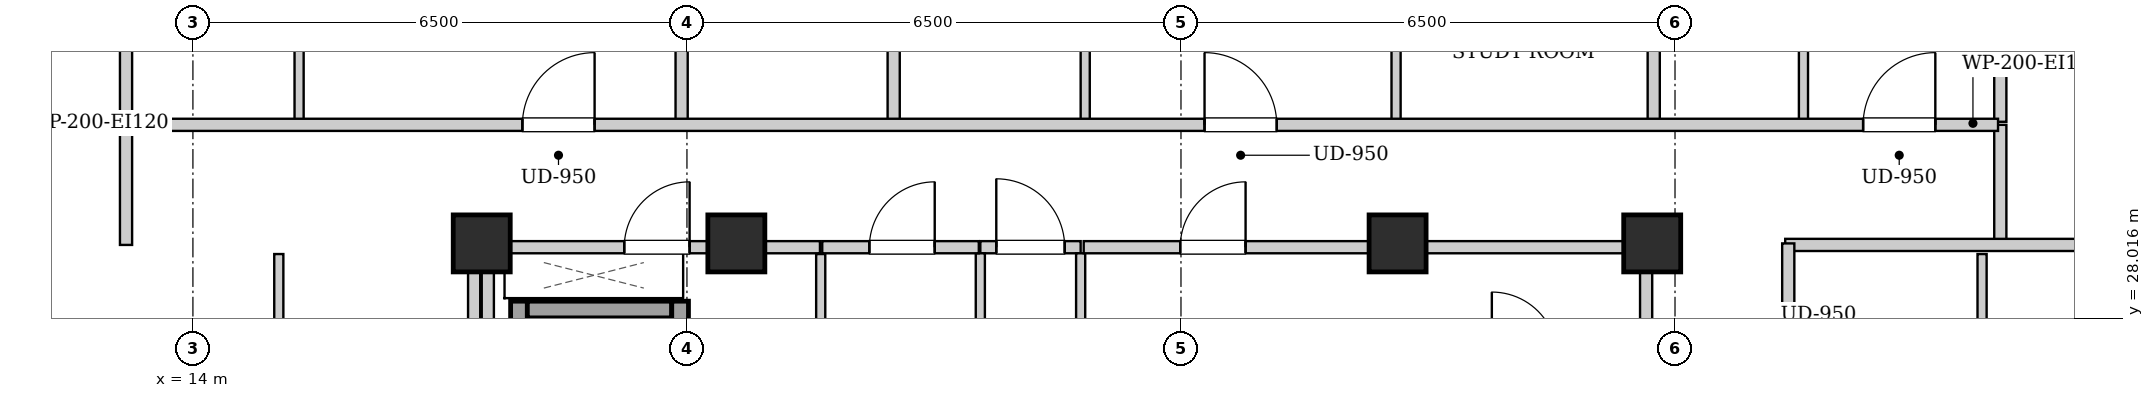
"""IFC4 building model, lengths in metres.
Left out: names, types, materials, properties, quantities, classifications, styles, units other than length and angle.
Written with IfcOpenShell. Run it as: python <this file> out.ifc"""

import sys

from ifc_helpers import new_model, si_unit, direction, frame, frame_2d, origin, origin_2d, place, context, subcontext, project, spatial, rectangle, extrude, element, fill, save


model = new_model("IFC4")
c1 = context("Model", 3, precision=1e-05, world=origin(), true_north=direction((0.0, 1.0)))
c2 = subcontext(c1, "Body", "Model", "MODEL_VIEW")
j1 = project(units=[si_unit("LENGTHUNIT", "METRE"), si_unit("PLANEANGLEUNIT", "RADIAN")], contexts=[c1])
p1 = place(None, origin())
s1 = spatial("IfcSite", under=j1, at=p1, CompositionType="ELEMENT")
p2 = place(p1, origin())
s2 = spatial("IfcBuilding", under=s1, at=p2, CompositionType="ELEMENT")
p3 = place(p2, frame((0.0, 0.0, 217.3)))
s3 = spatial("IfcBuildingStorey", under=s2, at=p3, CompositionType="ELEMENT", Elevation=217.3)
for number, where, z_axis, x_axis in (
    (1, (17.8, 29.0, 0.0), (0.0, 0.0, 1.0), (1.0, 0.0, 0.0)),
    (2, (21.15, 29.0, 0.0), (0.0, 0.0, 1.0), (1.0, 0.0, 0.0)),
    (3, (29.85, 29.0, 0.0), (0.0, 0.0, 1.0), (1.0, 0.0, 0.0)),
    (4, (33.2, 29.0, 0.0), (0.0, 0.0, 1.0), (1.0, 0.0, 0.0)),
):
    element("IfcColumn", number, at=place(p3, frame(where, z_axis=z_axis, x_axis=x_axis)), inside=s3, PredefinedType="COLUMN", context=c2, shape_type="SweptSolid", body=[
        extrude(rectangle(XDim=0.75, YDim=0.75, at=origin_2d()), origin(), (0.0, 0.0, 1.0), 3.4),
    ])
p4 = place(p3, frame((18.29, 24.1, 0.0), z_axis=(0.0, 0.0, 1.0), x_axis=(0.0, 1.0, 0.0)))
e5 = element("IfcWall", 5, at=p4, inside=s3, PredefinedType="SHEAR", context=c2, shape_type="SweptSolid", body=[
    extrude(rectangle(XDim=4.14, YDim=0.22, at=frame_2d((2.07, 0.0))), origin(), (0.0, 0.0, 1.0), 3.14),
])
p5 = place(p3, frame((18.4, 28.13, 0.0), z_axis=(0.0, 0.0, 1.0), x_axis=(1.0, 0.0, 0.0)))
e6 = element("IfcWall", 6, at=p5, inside=s3, PredefinedType="SHEAR", context=c2, shape_type="SweptSolid", body=[
    extrude(rectangle(XDim=1.9, YDim=0.22, at=frame_2d((0.95, 0.0))), origin(), (0.0, 0.0, 1.0), 3.14),
])
p6 = place(p3, frame((20.41, 26.06, 0.0), z_axis=(0.0, 0.0, 1.0), x_axis=(0.0, 1.0, 0.0)))
e7 = element("IfcWall", 7, at=p6, inside=s3, PredefinedType="SHEAR", context=c2, shape_type="SweptSolid", body=[
    extrude(rectangle(XDim=2.18, YDim=0.22, at=frame_2d((1.09, 0.0))), origin(), (0.0, 0.0, 1.0), 3.14),
])
p7 = place(p6, frame((0.54, 0.0, 0.0)))
e8 = element("IfcOpeningElement", 8, at=p7, cuts=e7, PredefinedType="OPENING", context=c2, shape_type="SweptSolid", body=[
    extrude(rectangle(XDim=1.1, YDim=2.15, at=frame_2d((0.55, 1.075))), frame((0.0, 0.12, 0.0), z_axis=(0.0, -1.0, 0.0), x_axis=(1.0, 0.0, 0.0)), (0.0, 0.0, 1.0), 0.24),
])
for number, where, z_axis, x_axis in (
    (9, (17.88, 24.12, 0.0), (0.0, 0.0, 1.0), (0.0, 1.0, 0.0)),
    (10, (33.12, 24.12, 0.0), (0.0, 0.0, 1.0), (0.0, 1.0, 0.0)),
):
    element("IfcWall", number, at=place(p3, frame(where, z_axis=z_axis, x_axis=x_axis)), inside=s3, PredefinedType="PARTITIONING", context=c2, shape_type="SweptSolid", body=[
        extrude(rectangle(XDim=4.76, YDim=0.16, at=frame_2d((2.38, 0.0))), origin(), (0.0, 0.0, 1.0), 2.475),
    ])
p8 = place(p3, frame((24.36, 28.95, 0.0), z_axis=(0.0, 0.0, 1.0), x_axis=(1.0, 0.0, 0.0)))
e11 = element("IfcWall", 11, at=p8, inside=s3, PredefinedType="PARTITIONING", context=c2, shape_type="SweptSolid", body=[
    extrude(rectangle(XDim=1.32, YDim=0.16, at=frame_2d((0.66, 0.0))), origin(), (0.0, 0.0, 1.0), 2.668),
])
p9 = place(p8, frame((0.21, 0.0, 0.0)))
e12 = element("IfcOpeningElement", 12, at=p9, cuts=e11, PredefinedType="OPENING", context=c2, shape_type="SweptSolid", body=[
    extrude(rectangle(XDim=0.9, YDim=2.05, at=frame_2d((0.45, 1.025))), frame((0.0, 0.09, 0.0), z_axis=(0.0, -1.0, 0.0), x_axis=(1.0, 0.0, 0.0)), (0.0, 0.0, 1.0), 0.18),
])
p10 = place(p3, frame((17.96, 28.95, 0.0), z_axis=(0.0, 0.0, 1.0), x_axis=(1.0, 0.0, 0.0)))
e13 = element("IfcWall", 13, at=p10, inside=s3, PredefinedType="PARTITIONING", context=c2, shape_type="SweptSolid", body=[
    extrude(rectangle(XDim=4.29, YDim=0.16, at=frame_2d((2.145, 0.0))), origin(), (0.0, 0.0, 1.0), 2.668),
])
p11 = place(p10, frame((1.715, 0.0, 0.0)))
e14 = element("IfcOpeningElement", 14, at=p11, cuts=e13, PredefinedType="OPENING", context=c2, shape_type="SweptSolid", body=[
    extrude(rectangle(XDim=0.86, YDim=2.05, at=frame_2d((0.43, 1.025))), frame((0.0, 0.09, 0.0), z_axis=(0.0, -1.0, 0.0), x_axis=(1.0, 0.0, 0.0)), (0.0, 0.0, 1.0), 0.18),
])
for number, where, z_axis, x_axis in (
    (15, (24.36, 25.0, 0.0), (0.0, 0.0, 1.0), (0.0, 1.0, 0.0)),
    (16, (25.68, 25.0, 0.0), (0.0, 0.0, 1.0), (0.0, 1.0, 0.0)),
):
    element("IfcWall", number, at=place(p3, frame(where, z_axis=z_axis, x_axis=x_axis)), inside=s3, PredefinedType="PARTITIONING", context=c2, shape_type="SweptSolid", body=[
        extrude(rectangle(XDim=3.87, YDim=0.12, at=frame_2d((1.935, 0.0))), origin(), (0.0, 0.0, 1.0), 3.14),
    ])
p12 = place(p3, frame((22.26, 25.0, 0.0), z_axis=(0.0, 0.0, 1.0), x_axis=(0.0, 1.0, 0.0)))
e17 = element("IfcWall", 17, at=p12, inside=s3, PredefinedType="PARTITIONING", context=c2, shape_type="SweptSolid", body=[
    extrude(rectangle(XDim=3.86, YDim=0.12, at=frame_2d((1.93, 0.0))), origin(), (0.0, 0.0, 1.0), 3.14),
])
p13 = place(p3, frame((22.28, 28.95, 0.0), z_axis=(0.0, 0.0, 1.0), x_axis=(1.0, 0.0, 0.0)))
e18 = element("IfcWall", 18, at=p13, inside=s3, PredefinedType="PARTITIONING", context=c2, shape_type="SweptSolid", body=[
    extrude(rectangle(XDim=2.06, YDim=0.16, at=frame_2d((1.03, 0.0))), origin(), (0.0, 0.0, 1.0), 2.668),
])
p14 = place(p13, frame((0.62, 0.0, 0.0)))
e19 = element("IfcOpeningElement", 19, at=p14, cuts=e18, PredefinedType="OPENING", context=c2, shape_type="SweptSolid", body=[
    extrude(rectangle(XDim=0.86, YDim=2.05, at=frame_2d((0.43, 1.025))), frame((0.0, 0.09, 0.0), z_axis=(0.0, -1.0, 0.0), x_axis=(1.0, 0.0, 0.0)), (0.0, 0.0, 1.0), 0.18),
])
p15 = place(p3, frame((25.72, 28.95, 0.0), z_axis=(0.0, 0.0, 1.0), x_axis=(1.0, 0.0, 0.0)))
e20 = element("IfcWall", 20, at=p15, inside=s3, PredefinedType="PARTITIONING", context=c2, shape_type="SweptSolid", body=[
    extrude(rectangle(XDim=7.32, YDim=0.16, at=frame_2d((3.66, 0.0))), origin(), (0.0, 0.0, 1.0), 2.668),
])
p16 = place(p15, frame((1.27, 0.0, 0.0)))
e21 = element("IfcOpeningElement", 21, at=p16, cuts=e20, PredefinedType="OPENING", context=c2, shape_type="SweptSolid", body=[
    extrude(rectangle(XDim=0.86, YDim=2.05, at=frame_2d((0.43, 1.025))), frame((0.0, 0.09, 0.0), z_axis=(0.0, -1.0, 0.0), x_axis=(1.0, 0.0, 0.0)), (0.0, 0.0, 1.0), 0.18),
])
for number, where, z_axis, x_axis in (
    (22, (13.12, 28.98, 0.0), (0.0, 0.0, 1.0), (0.0, 1.0, 0.0)),
    (23, (37.78, 28.98, 0.0), (0.0, 0.0, 1.0), (0.0, 1.0, 0.0)),
):
    element("IfcWall", number, at=place(p3, frame(where, z_axis=z_axis, x_axis=x_axis)), inside=s3, PredefinedType="PARTITIONING", context=c2, shape_type="SweptSolid", body=[
        extrude(rectangle(XDim=1.58, YDim=0.16, at=frame_2d((0.79, 0.0))), origin(), (0.0, 0.0, 1.0), 3.14),
    ])
p17 = place(p3, frame((34.95, 28.98, 0.0), z_axis=(0.0, 0.0, 1.0), x_axis=(1.0, 0.0, 0.0)))
e24 = element("IfcWall", 24, at=p17, inside=s3, PredefinedType="PARTITIONING", context=c2, shape_type="SweptSolid", body=[
    extrude(rectangle(XDim=5.07, YDim=0.16, at=frame_2d((2.535, 0.0))), origin(), (0.0, 0.0, 1.0), 2.668),
])
p18 = place(p3, frame((13.12, 30.6, 0.0), z_axis=(0.0, 0.0, 1.0), x_axis=(0.0, 1.0, 0.0)))
e25 = element("IfcWall", 25, at=p18, inside=s3, PredefinedType="PARTITIONING", context=c2, shape_type="SweptSolid", body=[
    extrude(rectangle(XDim=2.91, YDim=0.16, at=frame_2d((1.455, 0.0))), origin(), (0.0, 0.0, 1.0), 3.14),
])
p19 = place(p3, frame((20.43, 30.6, 0.0), z_axis=(0.0, 0.0, 1.0), x_axis=(0.0, 1.0, 0.0)))
e26 = element("IfcWall", 26, at=p19, inside=s3, PredefinedType="PARTITIONING", context=c2, shape_type="SweptSolid", body=[
    extrude(rectangle(XDim=9.32, YDim=0.16, at=frame_2d((4.66, 0.0))), origin(), (0.0, 0.0, 1.0), 3.14),
])
p20 = place(p3, frame((15.397, 30.6, 0.0), z_axis=(0.0, 0.0, 1.0), x_axis=(0.0, 1.0, 0.0)))
e27 = element("IfcWall", 27, at=p20, inside=s3, PredefinedType="PARTITIONING", context=c2, shape_type="SweptSolid", body=[
    extrude(rectangle(XDim=2.85, YDim=0.12, at=frame_2d((1.425, 0.0))), origin(), (0.0, 0.0, 1.0), 3.14),
])
p21 = place(p20, frame((0.995, 0.0, 0.0)))
e28 = element("IfcOpeningElement", 28, at=p21, cuts=e27, PredefinedType="OPENING", context=c2, shape_type="SweptSolid", body=[
    extrude(rectangle(XDim=0.86, YDim=2.05, at=frame_2d((0.43, 1.025))), frame((0.0, 0.07, 0.0), z_axis=(0.0, -1.0, 0.0), x_axis=(1.0, 0.0, 0.0)), (0.0, 0.0, 1.0), 0.14),
])
p22 = place(p3, frame((23.22, 30.6, 0.0), z_axis=(0.0, 0.0, 1.0), x_axis=(0.0, 1.0, 0.0)))
e29 = element("IfcWall", 29, at=p22, inside=s3, PredefinedType="PARTITIONING", context=c2, shape_type="SweptSolid", body=[
    extrude(rectangle(XDim=9.32, YDim=0.16, at=frame_2d((4.66, 0.0))), origin(), (0.0, 0.0, 1.0), 3.14),
])
p23 = place(p3, frame((25.74, 30.6, 0.0), z_axis=(0.0, 0.0, 1.0), x_axis=(0.0, 1.0, 0.0)))
e30 = element("IfcWall", 30, at=p23, inside=s3, PredefinedType="PARTITIONING", context=c2, shape_type="SweptSolid", body=[
    extrude(rectangle(XDim=2.85, YDim=0.12, at=frame_2d((1.425, 0.0))), origin(), (0.0, 0.0, 1.0), 3.14),
])
p24 = place(p23, frame((0.995, 0.0, 0.0)))
e31 = element("IfcOpeningElement", 31, at=p24, cuts=e30, PredefinedType="OPENING", context=c2, shape_type="SweptSolid", body=[
    extrude(rectangle(XDim=0.86, YDim=2.05, at=frame_2d((0.43, 1.025))), frame((0.0, 0.07, 0.0), z_axis=(0.0, -1.0, 0.0), x_axis=(1.0, 0.0, 0.0)), (0.0, 0.0, 1.0), 0.14),
])
p25 = place(p3, frame((29.83, 30.6, 0.0), z_axis=(0.0, 0.0, 1.0), x_axis=(0.0, 1.0, 0.0)))
e32 = element("IfcWall", 32, at=p25, inside=s3, PredefinedType="PARTITIONING", context=c2, shape_type="SweptSolid", body=[
    extrude(rectangle(XDim=2.85, YDim=0.12, at=frame_2d((1.425, 0.0))), origin(), (0.0, 0.0, 1.0), 3.14),
])
p26 = place(p25, frame((0.975, 0.0, 0.0)))
e33 = element("IfcOpeningElement", 33, at=p26, cuts=e32, PredefinedType="OPENING", context=c2, shape_type="SweptSolid", body=[
    extrude(rectangle(XDim=0.9, YDim=2.05, at=frame_2d((0.45, 1.025))), frame((0.0, 0.07, 0.0), z_axis=(0.0, -1.0, 0.0), x_axis=(1.0, 0.0, 0.0)), (0.0, 0.0, 1.0), 0.14),
])
p27 = place(p3, frame((37.78, 30.6, 0.0), z_axis=(0.0, 0.0, 1.0), x_axis=(0.0, 1.0, 0.0)))
e34 = element("IfcWall", 34, at=p27, inside=s3, PredefinedType="PARTITIONING", context=c2, shape_type="SweptSolid", body=[
    extrude(rectangle(XDim=2.91, YDim=0.16, at=frame_2d((1.455, 0.0))), origin(), (0.0, 0.0, 1.0), 3.14),
])
p28 = place(p3, frame((33.22, 30.6, 0.0), z_axis=(0.0, 0.0, 1.0), x_axis=(0.0, 1.0, 0.0)))
e35 = element("IfcWall", 35, at=p28, inside=s3, PredefinedType="PARTITIONING", context=c2, shape_type="SweptSolid", body=[
    extrude(rectangle(XDim=7.34, YDim=0.16, at=frame_2d((3.67, 0.0))), origin(), (0.0, 0.0, 1.0), 2.668),
])
p29 = place(p3, frame((35.19, 30.6, 0.0), z_axis=(0.0, 0.0, 1.0), x_axis=(0.0, 1.0, 0.0)))
e36 = element("IfcWall", 36, at=p29, inside=s3, PredefinedType="PARTITIONING", context=c2, shape_type="SweptSolid", body=[
    extrude(rectangle(XDim=2.85, YDim=0.12, at=frame_2d((1.425, 0.0))), origin(), (0.0, 0.0, 1.0), 3.14),
])
p30 = place(p29, frame((0.995, 0.0, 0.0)))
e37 = element("IfcOpeningElement", 37, at=p30, cuts=e36, PredefinedType="OPENING", context=c2, shape_type="SweptSolid", body=[
    extrude(rectangle(XDim=0.86, YDim=2.05, at=frame_2d((0.43, 1.025))), frame((0.0, 0.07, 0.0), z_axis=(0.0, -1.0, 0.0), x_axis=(1.0, 0.0, 0.0)), (0.0, 0.0, 1.0), 0.14),
])
p31 = place(p3, frame((15.13, 24.552, 0.0), z_axis=(0.0, 0.0, 1.0), x_axis=(0.0, 1.0, 0.0)))
e38 = element("IfcWall", 38, at=p31, inside=s3, PredefinedType="PARTITIONING", context=c2, shape_type="SweptSolid", body=[
    extrude(rectangle(XDim=4.308, YDim=0.12, at=frame_2d((2.154, 0.0))), origin(), (0.0, 0.0, 1.0), 3.14),
])
p32 = place(p31, frame((1.704, 0.0, 0.0)))
e39 = element("IfcOpeningElement", 39, at=p32, cuts=e38, PredefinedType="OPENING", context=c2, shape_type="SweptSolid", body=[
    extrude(rectangle(XDim=0.9, YDim=2.05, at=frame_2d((0.45, 1.025))), frame((0.0, 0.07, 0.0), z_axis=(0.0, -1.0, 0.0), x_axis=(1.0, 0.0, 0.0)), (0.0, 0.0, 1.0), 0.14),
])
p33 = place(p3, frame((37.54, 25.052, 0.0), z_axis=(0.0, 0.0, 1.0), x_axis=(0.0, 1.0, 0.0)))
e40 = element("IfcWall", 40, at=p33, inside=s3, PredefinedType="PARTITIONING", context=c2, shape_type="SweptSolid", body=[
    extrude(rectangle(XDim=3.808, YDim=0.12, at=frame_2d((1.904, 0.0))), origin(), (0.0, 0.0, 1.0), 3.14),
])
p34 = place(p33, frame((1.454, 0.0, 0.0)))
e41 = element("IfcOpeningElement", 41, at=p34, cuts=e40, PredefinedType="OPENING", context=c2, shape_type="SweptSolid", body=[
    extrude(rectangle(XDim=0.9, YDim=2.05, at=frame_2d((0.45, 1.025))), frame((0.0, 0.07, 0.0), z_axis=(0.0, -1.0, 0.0), x_axis=(1.0, 0.0, 0.0)), (0.0, 0.0, 1.0), 0.14),
])
p35 = place(p3, frame((13.15, 30.56, 0.0), z_axis=(0.0, 0.0, 1.0), x_axis=(1.0, 0.0, 0.0)))
e42 = element("IfcWall", 42, at=p35, inside=s3, PredefinedType="PARTITIONING", context=c2, shape_type="SweptSolid", body=[
    extrude(rectangle(XDim=24.6, YDim=0.16, at=frame_2d((12.3, 0.0))), origin(), (0.0, 0.0, 1.0), 3.14),
])
p36 = place(p35, frame((5.185, 0.0, 0.0)))
e43 = element("IfcOpeningElement", 43, at=p36, cuts=e42, PredefinedType="OPENING", context=c2, shape_type="SweptSolid", body=[
    extrude(rectangle(XDim=0.95, YDim=2.1, at=frame_2d((0.475, 1.05))), frame((0.0, 0.09, 0.0), z_axis=(0.0, -1.0, 0.0), x_axis=(1.0, 0.0, 0.0)), (0.0, 0.0, 1.0), 0.18),
])
p37 = place(p35, frame((14.16, 0.0, 0.0)))
e44 = element("IfcOpeningElement", 44, at=p37, cuts=e42, PredefinedType="OPENING", context=c2, shape_type="SweptSolid", body=[
    extrude(rectangle(XDim=0.95, YDim=2.1, at=frame_2d((0.475, 1.05))), frame((0.0, 0.09, 0.0), z_axis=(0.0, -1.0, 0.0), x_axis=(1.0, 0.0, 0.0)), (0.0, 0.0, 1.0), 0.18),
])
p38 = place(p35, frame((22.825, 0.0, 0.0)))
e45 = element("IfcOpeningElement", 45, at=p38, cuts=e42, PredefinedType="OPENING", context=c2, shape_type="SweptSolid", body=[
    extrude(rectangle(XDim=0.95, YDim=2.1, at=frame_2d((0.475, 1.05))), frame((0.0, 0.09, 0.0), z_axis=(0.0, -1.0, 0.0), x_axis=(1.0, 0.0, 0.0)), (0.0, 0.0, 1.0), 0.18),
])
p39 = place(p3, frame((17.7, 15.02, 0.0), z_axis=(0.0, 0.0, 1.0), x_axis=(0.0, 1.0, 0.0)))
e46 = element("IfcWall", 46, at=p39, inside=s3, PredefinedType="PARTITIONING", context=c2, shape_type="SweptSolid", body=[
    extrude(rectangle(XDim=13.98, YDim=0.16, at=frame_2d((6.99, 0.0))), origin(), (0.0, 0.0, 1.0), 2.475),
])
p40 = place(p3, frame((34.99, 15.07, 0.0), z_axis=(0.0, 0.0, 1.0), x_axis=(0.0, 1.0, 0.0)))
e47 = element("IfcWall", 47, at=p40, inside=s3, PredefinedType="PARTITIONING", context=c2, shape_type="SweptSolid", body=[
    extrude(rectangle(XDim=13.93, YDim=0.16, at=frame_2d((6.965, 0.0))), origin(), (0.0, 0.0, 1.0), 3.14),
])
p41 = place(p40, frame((4.661, 0.0, 0.0)))
e48 = element("IfcOpeningElement", 48, at=p41, cuts=e47, PredefinedType="OPENING", context=c2, shape_type="SweptSolid", body=[
    extrude(rectangle(XDim=0.95, YDim=2.1, at=frame_2d((0.475, 1.05))), frame((0.0, 0.09, 0.0), z_axis=(0.0, -1.0, 0.0), x_axis=(1.0, 0.0, 0.0)), (0.0, 0.0, 1.0), 0.18),
])
p42 = place(p40, frame((11.411, 0.0, 0.0)))
e49 = element("IfcOpeningElement", 49, at=p42, cuts=e47, PredefinedType="OPENING", context=c2, shape_type="SweptSolid", body=[
    extrude(rectangle(XDim=0.95, YDim=2.1, at=frame_2d((0.475, 1.05))), frame((0.0, 0.09, 0.0), z_axis=(0.0, -1.0, 0.0), x_axis=(1.0, 0.0, 0.0)), (0.0, 0.0, 1.0), 0.18),
])
p43 = place(p9, origin())
e50 = element("IfcDoor", 50, at=p43, inside=s3, OperationType="SINGLE_SWING_LEFT", PredefinedType="DOOR", context=c2, shape_type="SweptSolid", body=[
    extrude(rectangle(XDim=0.9, YDim=2.05, at=frame_2d((0.45, 1.025))), frame((0.0, 0.025, 0.0), z_axis=(0.0, -1.0, 0.0), x_axis=(1.0, 0.0, 0.0)), (0.0, 0.0, 1.0), 0.05),
])
fill(e12, e50)
p44 = place(p11, origin())
e51 = element("IfcDoor", 51, at=p44, inside=s3, OperationType="SINGLE_SWING_RIGHT", PredefinedType="DOOR", context=c2, shape_type="SweptSolid", body=[
    extrude(rectangle(XDim=0.86, YDim=2.05, at=frame_2d((0.43, 1.025))), frame((0.0, 0.025, 0.0), z_axis=(0.0, -1.0, 0.0), x_axis=(1.0, 0.0, 0.0)), (0.0, 0.0, 1.0), 0.05),
])
fill(e14, e51)
p45 = place(p14, origin())
e52 = element("IfcDoor", 52, at=p45, inside=s3, OperationType="SINGLE_SWING_RIGHT", PredefinedType="DOOR", context=c2, shape_type="SweptSolid", body=[
    extrude(rectangle(XDim=0.86, YDim=2.05, at=frame_2d((0.43, 1.025))), frame((0.0, 0.025, 0.0), z_axis=(0.0, -1.0, 0.0), x_axis=(1.0, 0.0, 0.0)), (0.0, 0.0, 1.0), 0.05),
])
fill(e19, e52)
p46 = place(p16, origin())
e53 = element("IfcDoor", 53, at=p46, inside=s3, OperationType="SINGLE_SWING_RIGHT", PredefinedType="DOOR", context=c2, shape_type="SweptSolid", body=[
    extrude(rectangle(XDim=0.86, YDim=2.05, at=frame_2d((0.43, 1.025))), frame((0.0, 0.025, 0.0), z_axis=(0.0, -1.0, 0.0), x_axis=(1.0, 0.0, 0.0)), (0.0, 0.0, 1.0), 0.05),
])
fill(e21, e53)
p47 = place(p36, origin())
e54 = element("IfcDoor", 54, at=p47, inside=s3, OperationType="SINGLE_SWING_RIGHT", PredefinedType="DOOR", context=c2, shape_type="SweptSolid", body=[
    extrude(rectangle(XDim=0.95, YDim=2.1, at=frame_2d((0.475, 1.05))), frame((0.0, 0.025, 0.0), z_axis=(0.0, -1.0, 0.0), x_axis=(1.0, 0.0, 0.0)), (0.0, 0.0, 1.0), 0.05),
])
fill(e43, e54)
p48 = place(p37, origin())
e55 = element("IfcDoor", 55, at=p48, inside=s3, OperationType="SINGLE_SWING_LEFT", PredefinedType="DOOR", context=c2, shape_type="SweptSolid", body=[
    extrude(rectangle(XDim=0.95, YDim=2.1, at=frame_2d((0.475, 1.05))), frame((0.0, 0.025, 0.0), z_axis=(0.0, -1.0, 0.0), x_axis=(1.0, 0.0, 0.0)), (0.0, 0.0, 1.0), 0.05),
])
fill(e44, e55)
p49 = place(p38, origin())
e56 = element("IfcDoor", 56, at=p49, inside=s3, OperationType="SINGLE_SWING_RIGHT", PredefinedType="DOOR", context=c2, shape_type="SweptSolid", body=[
    extrude(rectangle(XDim=0.95, YDim=2.1, at=frame_2d((0.475, 1.05))), frame((0.0, 0.025, 0.0), z_axis=(0.0, -1.0, 0.0), x_axis=(1.0, 0.0, 0.0)), (0.0, 0.0, 1.0), 0.05),
])
fill(e45, e56)
save(model, sys.argv[1])
